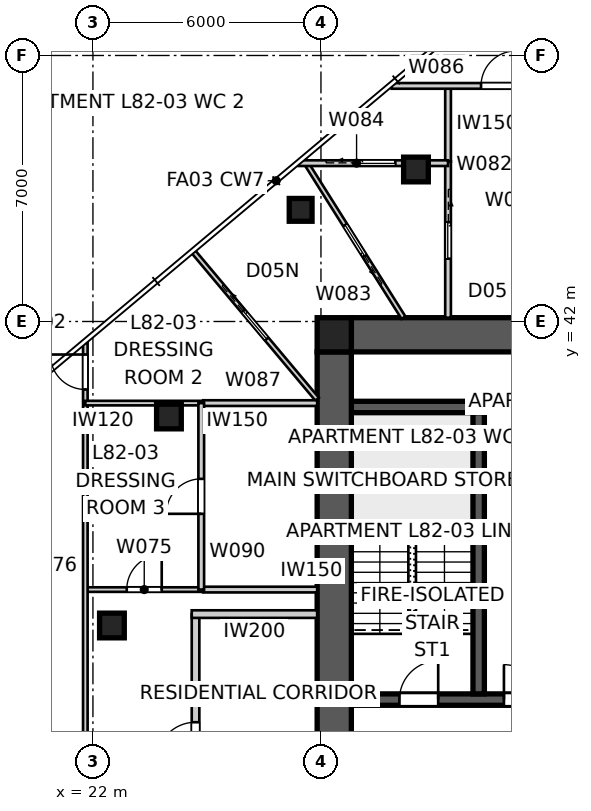
"""IFC4 building model, lengths in metres.
Left out: names, types, materials, properties, quantities, classifications, styles, units other than length and angle.
Written with IfcOpenShell. Run it as: python <this file> out.ifc"""

import sys

from ifc_helpers import new_model, si_unit, direction, frame, frame_2d, origin, origin_2d, place, context, subcontext, project, spatial, polyline, rectangle, outline, extrude, element, fill, save


model = new_model("IFC4")
c1 = context("Model", 3, precision=1e-05, world=origin(), true_north=direction((0.0, 1.0)))
c2 = subcontext(c1, "Body", "Model", "MODEL_VIEW")
j1 = project(units=[si_unit("LENGTHUNIT", "METRE"), si_unit("PLANEANGLEUNIT", "RADIAN")], contexts=[c1])
p1 = place(None, origin())
s1 = spatial("IfcSite", under=j1, at=p1, CompositionType="ELEMENT")
p2 = place(p1, origin())
s2 = spatial("IfcBuilding", under=s1, at=p2, CompositionType="ELEMENT")
p3 = place(p2, frame((0.0, 0.0, 296.4)))
s3 = spatial("IfcBuildingStorey", under=s2, at=p3, CompositionType="ELEMENT", Elevation=296.4)
p4 = place(p3, frame((28.8, 41.65, 0.0), z_axis=(0.0, 0.0, 1.0), x_axis=(1.0, 0.0, 0.0)))
e1 = element("IfcWall", 1, at=p4, inside=s3, PredefinedType="SHEAR", context=c2, shape_type="SweptSolid", body=[
    extrude(outline(polyline([(0.0, -0.45), (22.4, -0.45), (22.4, -0.025), (22.85, -0.025), (22.85, 0.025), (22.4, 0.025), (22.4, 0.45), (0.0, 0.45), (0.0, 0.025), (-0.45, 0.025), (-0.45, -0.025), (0.0, -0.025), (0.0, -0.45)])), origin(), (0.0, 0.0, 1.0), 3.4),
])
p5 = place(p3, frame((28.35, 41.2, 0.0), z_axis=(0.0, 0.0, 1.0), x_axis=(0.0, -1.0, 0.0)))
e2 = element("IfcWall", 2, at=p5, inside=s3, PredefinedType="SHEAR", context=c2, shape_type="SweptSolid", body=[
    extrude(outline(polyline([(0.0, -0.45), (22.4, -0.45), (22.4, -0.025), (22.85, -0.025), (22.85, 0.025), (22.4, 0.025), (22.4, 0.45), (0.0, 0.45), (0.0, 0.025), (-0.45, 0.025), (-0.45, -0.025), (0.0, -0.025), (0.0, -0.45)])), origin(), (0.0, 0.0, 1.0), 3.4),
])
p6 = place(p5, frame((11.14, 0.0, 0.0)))
e3 = element("IfcOpeningElement", 3, at=p6, cuts=e2, PredefinedType="OPENING", context=c2, shape_type="SweptSolid", body=[
    extrude(rectangle(XDim=1.02, YDim=2.4, at=frame_2d((0.51, 1.2))), frame((0.0, 0.46, 0.0), z_axis=(0.0, -1.0, 0.0), x_axis=(1.0, 0.0, 0.0)), (0.0, 0.0, 1.0), 0.92),
])
p7 = place(p3, frame((28.8, 32.05, 0.0), z_axis=(0.0, 0.0, 1.0), x_axis=(1.0, 0.0, 0.0)))
e4 = element("IfcWall", 4, at=p7, inside=s3, PredefinedType="SHEAR", context=c2, shape_type="SweptSolid", body=[
    extrude(rectangle(XDim=22.4, YDim=0.3, at=frame_2d((11.2, 0.0))), origin(), (0.0, 0.0, 1.0), 3.4),
])
p8 = place(p7, frame((19.04, 0.0, 0.0)))
e5 = element("IfcOpeningElement", 5, at=p8, cuts=e4, PredefinedType="OPENING", context=c2, shape_type="SweptSolid", body=[
    extrude(rectangle(XDim=0.92, YDim=2.1, at=frame_2d((0.46, 1.05))), frame((0.0, 0.16, 0.0), z_axis=(0.0, -1.0, 0.0), x_axis=(1.0, 0.0, 0.0)), (0.0, 0.0, 1.0), 0.32),
])
p9 = place(p7, frame((1.265, 0.0, 0.0)))
e6 = element("IfcOpeningElement", 6, at=p9, cuts=e4, PredefinedType="OPENING", context=c2, shape_type="SweptSolid", body=[
    extrude(rectangle(XDim=1.02, YDim=2.1, at=frame_2d((0.51, 1.05))), frame((0.0, 0.16, 0.0), z_axis=(0.0, -1.0, 0.0), x_axis=(1.0, 0.0, 0.0)), (0.0, 0.0, 1.0), 0.32),
])
p10 = place(p7, frame((4.015, 0.0, 0.0)))
e7 = element("IfcOpeningElement", 7, at=p10, cuts=e4, PredefinedType="OPENING", context=c2, shape_type="SweptSolid", body=[
    extrude(rectangle(XDim=0.92, YDim=2.1, at=frame_2d((0.46, 1.05))), frame((0.0, 0.16, 0.0), z_axis=(0.0, -1.0, 0.0), x_axis=(1.0, 0.0, 0.0)), (0.0, 0.0, 1.0), 0.32),
])
p11 = place(p7, frame((6.115, 0.0, 0.0)))
e8 = element("IfcOpeningElement", 8, at=p11, cuts=e4, PredefinedType="OPENING", context=c2, shape_type="SweptSolid", body=[
    extrude(rectangle(XDim=0.92, YDim=2.1, at=frame_2d((0.46, 1.05))), frame((0.0, 0.16, 0.0), z_axis=(0.0, -1.0, 0.0), x_axis=(1.0, 0.0, 0.0)), (0.0, 0.0, 1.0), 0.32),
])
p12 = place(p7, frame((9.79, 0.0, 0.0)))
e9 = element("IfcOpeningElement", 9, at=p12, cuts=e4, PredefinedType="OPENING", context=c2, shape_type="SweptSolid", body=[
    extrude(rectangle(XDim=0.92, YDim=2.1, at=frame_2d((0.46, 1.05))), frame((0.0, 0.16, 0.0), z_axis=(0.0, -1.0, 0.0), x_axis=(1.0, 0.0, 0.0)), (0.0, 0.0, 1.0), 0.32),
])
p13 = place(p7, frame((12.05, 0.0, 0.0)))
e10 = element("IfcOpeningElement", 10, at=p13, cuts=e4, PredefinedType="OPENING", context=c2, shape_type="SweptSolid", body=[
    extrude(rectangle(XDim=1.1, YDim=2.1, at=frame_2d((0.55, 1.05))), frame((0.0, 0.16, 0.0), z_axis=(0.0, -1.0, 0.0), x_axis=(1.0, 0.0, 0.0)), (0.0, 0.0, 1.0), 0.32),
])
p14 = place(p7, frame((14.85, 0.0, 0.0)))
e11 = element("IfcOpeningElement", 11, at=p14, cuts=e4, PredefinedType="OPENING", context=c2, shape_type="SweptSolid", body=[
    extrude(rectangle(XDim=1.1, YDim=2.1, at=frame_2d((0.55, 1.05))), frame((0.0, 0.16, 0.0), z_axis=(0.0, -1.0, 0.0), x_axis=(1.0, 0.0, 0.0)), (0.0, 0.0, 1.0), 0.32),
])
p15 = place(p3, frame((32.15, 32.2, 0.0), z_axis=(0.0, 0.0, 1.0), x_axis=(0.0, 1.0, 0.0)))
e12 = element("IfcWall", 12, at=p15, inside=s3, PredefinedType="SHEAR", context=c2, shape_type="SweptSolid", body=[
    extrude(rectangle(XDim=7.7, YDim=0.3, at=frame_2d((3.85, 0.0))), origin(), (0.0, 0.0, 1.0), 3.4),
])
p16 = place(p3, frame((28.8, 39.75, 0.0), z_axis=(0.0, 0.0, 1.0), x_axis=(1.0, 0.0, 0.0)))
e13 = element("IfcWall", 13, at=p16, inside=s3, PredefinedType="SHEAR", context=c2, shape_type="SweptSolid", body=[
    extrude(rectangle(XDim=3.5, YDim=0.3, at=frame_2d((1.75, 0.0))), origin(), (0.0, 0.0, 1.0), 3.4),
])
p17 = place(p3, frame((28.35, 41.65, 0.0), z_axis=(0.0, 0.0, 1.0), x_axis=(1.0, 0.0, 0.0)))
e14 = element("IfcColumn", 14, at=p17, inside=s3, PredefinedType="COLUMN", context=c2, shape_type="SweptSolid", body=[
    extrude(rectangle(XDim=0.9, YDim=0.9, at=origin_2d()), origin(), (0.0, 0.0, 1.0), 3.4),
])
p18 = place(p3, frame((27.466, 44.938, 0.0), z_axis=(0.0, 0.0, 1.0), x_axis=(1.0, 0.0, 0.0)))
e15 = element("IfcColumn", 15, at=p18, inside=s3, PredefinedType="COLUMN", context=c2, shape_type="SweptSolid", body=[
    extrude(rectangle(XDim=0.6, YDim=0.6, at=origin_2d()), origin(), (0.0, 0.0, 1.0), 3.4),
])
for number, where, z_axis, x_axis in (
    (16, (30.5, 46.0, 0.0), (0.0, 0.0, 1.0), (1.0, 0.0, 0.0)),
    (17, (24.0, 39.5, 0.0), (0.0, 0.0, 1.0), (1.0, 0.0, 0.0)),
    (18, (22.5, 34.0, 0.0), (0.0, 0.0, 1.0), (1.0, 0.0, 0.0)),
):
    element("IfcColumn", number, at=place(p3, frame(where, z_axis=z_axis, x_axis=x_axis)), inside=s3, PredefinedType="COLUMN", context=c2, shape_type="SweptSolid", body=[
        extrude(rectangle(XDim=0.65, YDim=0.65, at=origin_2d()), origin(), (0.0, 0.0, 1.0), 3.4),
    ])
p19 = place(p3, frame((24.7, 25.7, 0.0), z_axis=(0.0, 0.0, 1.0), x_axis=(0.0, 1.0, 0.0)))
e19 = element("IfcWall", 19, at=p19, inside=s3, PredefinedType="PARTITIONING", context=c2, shape_type="SweptSolid", body=[
    extrude(rectangle(XDim=8.6, YDim=0.2, at=frame_2d((4.3, 0.0))), origin(), (0.0, 0.0, 1.0), 3.2),
])
p20 = place(p19, frame((4.734, 0.0, 0.0)))
e20 = element("IfcOpeningElement", 20, at=p20, cuts=e19, PredefinedType="OPENING", context=c2, shape_type="SweptSolid", body=[
    extrude(rectangle(XDim=1.02, YDim=2.34, at=frame_2d((0.51, 1.17))), frame((0.0, 0.11, 0.0), z_axis=(0.0, -1.0, 0.0), x_axis=(1.0, 0.0, 0.0)), (0.0, 0.0, 1.0), 0.22),
])
p21 = place(p3, frame((27.9, 34.3, 0.0), z_axis=(0.0, 0.0, 1.0), x_axis=(-1.0, 0.0, 0.0)))
e21 = element("IfcWall", 21, at=p21, inside=s3, PredefinedType="PARTITIONING", context=c2, shape_type="SweptSolid", body=[
    extrude(rectangle(XDim=3.3, YDim=0.2, at=frame_2d((1.65, 0.0))), origin(), (0.0, 0.0, 1.0), 3.2),
])
p22 = place(p3, frame((24.9, 34.945, 0.0), z_axis=(0.0, 0.0, 1.0), x_axis=(1.0, 0.0, 0.0)))
e22 = element("IfcWall", 22, at=p22, inside=s3, PredefinedType="SOLIDWALL", context=c2, shape_type="SweptSolid", body=[
    extrude(rectangle(XDim=3.0, YDim=0.15, at=frame_2d((1.5, 0.0))), origin(), (0.0, 0.0, 1.0), 3.2),
])
p23 = place(p3, frame((21.8, 34.945, 0.0), z_axis=(0.0, 0.0, 1.0), x_axis=(1.0, 0.0, 0.0)))
e23 = element("IfcWall", 23, at=p23, inside=s3, PredefinedType="PARTITIONING", context=c2, shape_type="SweptSolid", body=[
    extrude(rectangle(XDim=3.1, YDim=0.12, at=frame_2d((1.55, 0.0))), origin(), (0.0, 0.0, 1.0), 3.2),
])
p24 = place(p23, frame((1.09, 0.0, 0.0)))
e24 = element("IfcOpeningElement", 24, at=p24, cuts=e23, PredefinedType="OPENING", context=c2, shape_type="SweptSolid", body=[
    extrude(rectangle(XDim=0.92, YDim=2.1, at=frame_2d((0.46, 1.05))), frame((0.0, 0.07, 0.0), z_axis=(0.0, -1.0, 0.0), x_axis=(1.0, 0.0, 0.0)), (0.0, 0.0, 1.0), 0.14),
])
p25 = place(p3, frame((21.8, 25.498, 0.0), z_axis=(0.0, 0.0, 1.0), x_axis=(0.0, 1.0, 0.0)))
e25 = element("IfcWall", 25, at=p25, inside=s3, PredefinedType="PARTITIONING", context=c2, shape_type="SweptSolid", body=[
    extrude(rectangle(XDim=15.939, YDim=0.12, at=frame_2d((7.969, 0.0))), origin(), (0.0, 0.0, 1.0), 3.2),
])
p26 = place(p25, frame((4.486, 0.0, 0.0)))
e26 = element("IfcOpeningElement", 26, at=p26, cuts=e25, PredefinedType="OPENING", context=c2, shape_type="SweptSolid", body=[
    extrude(rectangle(XDim=0.92, YDim=2.34, at=frame_2d((0.46, 1.17))), frame((0.0, 0.07, 0.0), z_axis=(0.0, -1.0, 0.0), x_axis=(1.0, 0.0, 0.0)), (0.0, 0.0, 1.0), 0.14),
])
p27 = place(p25, frame((14.713, 0.0, 0.0)))
e27 = element("IfcOpeningElement", 27, at=p27, cuts=e25, PredefinedType="OPENING", context=c2, shape_type="SweptSolid", body=[
    extrude(rectangle(XDim=0.92, YDim=2.34, at=frame_2d((0.46, 1.17))), frame((0.0, 0.07, 0.0), z_axis=(0.0, -1.0, 0.0), x_axis=(1.0, 0.0, 0.0)), (0.0, 0.0, 1.0), 0.14),
])
p28 = place(p3, frame((31.344, 48.2, 0.0), z_axis=(0.0, 0.0, 1.0), x_axis=(0.0, -1.0, 0.0)))
e28 = element("IfcWall", 28, at=p28, inside=s3, PredefinedType="SOLIDWALL", context=c2, shape_type="SweptSolid", body=[
    extrude(rectangle(XDim=1.992, YDim=0.15, at=frame_2d((0.996, 0.0))), origin(), (0.0, 0.0, 1.0), 3.2),
])
p29 = place(p3, frame((31.344, 46.208, 0.0), z_axis=(0.0, 0.0, 1.0), x_axis=(0.0, -1.0, 0.0)))
e29 = element("IfcWall", 29, at=p29, inside=s3, PredefinedType="SOLIDWALL", context=c2, shape_type="SweptSolid", body=[
    extrude(rectangle(XDim=4.108, YDim=0.15, at=frame_2d((2.054, 0.0))), origin(), (0.0, 0.0, 1.0), 2.672),
])
p30 = place(p29, frame((1.595, 0.0, 0.0)))
e30 = element("IfcOpeningElement", 30, at=p30, cuts=e29, PredefinedType="OPENING", context=c2, shape_type="SweptSolid", body=[
    extrude(rectangle(XDim=0.96, YDim=2.1, at=frame_2d((0.48, 1.05))), frame((0.0, 0.085, 0.0), z_axis=(0.0, -1.0, 0.0), x_axis=(1.0, 0.0, 0.0)), (0.0, 0.0, 1.0), 0.17),
])
p31 = place(p3, frame((30.172, 42.1, 0.0), z_axis=(0.0, 0.0, 1.0), x_axis=(-0.532913303443, 0.846169847616, 0.0)))
e31 = element("IfcWall", 31, at=p31, inside=s3, PredefinedType="PARTITIONING", context=c2, shape_type="SweptSolid", body=[
    extrude(rectangle(XDim=4.919, YDim=0.12, at=frame_2d((2.46, 0.0))), origin(), (0.0, 0.0, 1.0), 3.2),
])
p32 = place(p31, frame((1.923, 0.0, 0.0)))
e32 = element("IfcOpeningElement", 32, at=p32, cuts=e31, PredefinedType="OPENING", context=c2, shape_type="SweptSolid", body=[
    extrude(rectangle(XDim=0.96, YDim=2.0, at=frame_2d((0.48, 1.0))), frame((0.0, 0.07, 0.0), z_axis=(0.0, -1.0, 0.0), x_axis=(1.0, 0.0, 0.0)), (0.0, 0.0, 1.0), 0.14),
])
p33 = place(p3, frame((27.414, 46.167, 0.0), z_axis=(0.0, 0.0, 1.0), x_axis=(1.0, 0.0, 0.0)))
e33 = element("IfcWall", 33, at=p33, inside=s3, PredefinedType="SOLIDWALL", context=c2, shape_type="SweptSolid", body=[
    extrude(rectangle(XDim=3.046, YDim=0.15, at=frame_2d((1.523, 0.0))), origin(), (0.0, 0.0, 1.0), 3.2),
])
p34 = place(p33, frame((1.583, 0.0, 0.0)))
e34 = element("IfcOpeningElement", 34, at=p34, cuts=e33, PredefinedType="OPENING", context=c2, shape_type="SweptSolid", body=[
    extrude(rectangle(XDim=0.96, YDim=2.1, at=frame_2d((0.48, 1.05))), frame((0.0, 0.085, 0.0), z_axis=(0.0, -1.0, 0.0), x_axis=(1.0, 0.0, 0.0)), (0.0, 0.0, 1.0), 0.17),
])
p35 = place(p3, frame((30.46, 46.167, 0.0), z_axis=(0.0, 0.0, 1.0), x_axis=(1.0, 0.0, 0.0)))
e35 = element("IfcWall", 35, at=p35, inside=s3, PredefinedType="SOLIDWALL", context=c2, shape_type="SweptSolid", body=[
    extrude(rectangle(XDim=0.884, YDim=0.15, at=frame_2d((0.442, 0.0))), origin(), (0.0, 0.0, 1.0), 2.2),
])
p36 = place(p3, frame((29.86, 48.2, 0.0), z_axis=(0.0, 0.0, 1.0), x_axis=(1.0, 0.0, 0.0)))
e36 = element("IfcWall", 36, at=p36, inside=s3, PredefinedType="SOLIDWALL", context=c2, shape_type="SweptSolid", body=[
    extrude(rectangle(XDim=4.141, YDim=0.15, at=frame_2d((2.07, 0.0))), origin(), (0.0, 0.0, 1.0), 3.2),
])
p37 = place(p36, frame((2.353, 0.0, 0.0)))
e37 = element("IfcOpeningElement", 37, at=p37, cuts=e36, PredefinedType="OPENING", context=c2, shape_type="SweptSolid", body=[
    extrude(rectangle(XDim=0.92, YDim=2.34, at=frame_2d((0.46, 1.17))), frame((0.0, 0.085, 0.0), z_axis=(0.0, -1.0, 0.0), x_axis=(1.0, 0.0, 0.0)), (0.0, 0.0, 1.0), 0.17),
])
p38 = place(p3, frame((24.65, 43.828, 0.0), z_axis=(0.0, 0.0, 1.0), x_axis=(0.64277866568, -0.766051947943, 0.0)))
e38 = element("IfcWall", 38, at=p38, inside=s3, PredefinedType="PARTITIONING", context=c2, shape_type="SweptSolid", body=[
    extrude(rectangle(XDim=5.056, YDim=0.12, at=frame_2d((2.528, 0.0))), origin(), (0.0, 0.0, 1.0), 3.2),
])
p39 = place(p38, frame((2.028, 0.0, 0.0)))
e39 = element("IfcOpeningElement", 39, at=p39, cuts=e38, PredefinedType="OPENING", context=c2, shape_type="SweptSolid", body=[
    extrude(rectangle(XDim=0.96, YDim=2.0, at=frame_2d((0.48, 1.0))), frame((0.0, 0.07, 0.0), z_axis=(0.0, -1.0, 0.0), x_axis=(1.0, 0.0, 0.0)), (0.0, 0.0, 1.0), 0.14),
])
p40 = place(p3, frame((27.9, 39.852, 0.0), z_axis=(0.0, 0.0, 1.0), x_axis=(-1.0, 0.0, 0.0)))
e40 = element("IfcWall", 40, at=p40, inside=s3, PredefinedType="SOLIDWALL", context=c2, shape_type="SweptSolid", body=[
    extrude(rectangle(XDim=3.0, YDim=0.15, at=frame_2d((1.5, 0.0))), origin(), (0.0, 0.0, 1.0), 3.2),
])
p41 = place(p3, frame((24.9, 39.852, 0.0), z_axis=(0.0, 0.0, 1.0), x_axis=(-1.0, 0.0, 0.0)))
e41 = element("IfcWall", 41, at=p41, inside=s3, PredefinedType="PARTITIONING", context=c2, shape_type="SweptSolid", body=[
    extrude(rectangle(XDim=3.1, YDim=0.12, at=frame_2d((1.55, 0.0))), origin(), (0.0, 0.0, 1.0), 3.2),
])
p42 = place(p3, frame((24.85, 34.945, 0.0), z_axis=(0.0, 0.0, 1.0), x_axis=(0.0, 1.0, 0.0)))
e42 = element("IfcWall", 42, at=p42, inside=s3, PredefinedType="SOLIDWALL", context=c2, shape_type="SweptSolid", body=[
    extrude(rectangle(XDim=4.907, YDim=0.15, at=frame_2d((2.454, 0.0))), origin(), (0.0, 0.0, 1.0), 3.2),
])
p43 = place(p42, frame((1.994, 0.0, 0.0)))
e43 = element("IfcOpeningElement", 43, at=p43, cuts=e42, PredefinedType="OPENING", context=c2, shape_type="SweptSolid", body=[
    extrude(rectangle(XDim=0.92, YDim=2.34, at=frame_2d((0.46, 1.17))), frame((0.0, 0.085, 0.0), z_axis=(0.0, -1.0, 0.0), x_axis=(1.0, 0.0, 0.0)), (0.0, 0.0, 1.0), 0.17),
])
p44 = place(p3, frame((21.8, 26.021, 0.0), z_axis=(0.0, 0.0, 1.0), x_axis=(-0.642785106342, 0.766046543668, 0.0)))
e44 = element("IfcWall", 44, at=p44, inside=s3, PredefinedType="PARTITIONING", context=c2, shape_type="SweptSolid", body=[
    extrude(rectangle(XDim=7.81, YDim=0.12, at=frame_2d((3.905, 0.0))), origin(), (0.0, 0.0, 1.0), 3.2),
])
p45 = place(p44, frame((5.465, 0.0, 0.0)))
e45 = element("IfcOpeningElement", 45, at=p45, cuts=e44, PredefinedType="OPENING", context=c2, shape_type="SweptSolid", body=[
    extrude(rectangle(XDim=0.92, YDim=2.34, at=frame_2d((0.46, 1.17))), frame((0.0, 0.07, 0.0), z_axis=(0.0, -1.0, 0.0), x_axis=(1.0, 0.0, 0.0)), (0.0, 0.0, 1.0), 0.14),
])
p46 = place(p9, origin())
e46 = element("IfcDoor", 46, at=p46, inside=s3, OperationType="SINGLE_SWING_RIGHT", PredefinedType="DOOR", context=c2, shape_type="SweptSolid", body=[
    extrude(rectangle(XDim=1.02, YDim=2.1, at=frame_2d((0.51, 1.05))), frame((0.0, 0.025, 0.0), z_axis=(0.0, -1.0, 0.0), x_axis=(1.0, 0.0, 0.0)), (0.0, 0.0, 1.0), 0.05),
])
fill(e6, e46)
p47 = place(p10, origin())
e47 = element("IfcDoor", 47, at=p47, inside=s3, OperationType="SINGLE_SWING_LEFT", PredefinedType="DOOR", context=c2, shape_type="SweptSolid", body=[
    extrude(rectangle(XDim=0.92, YDim=2.1, at=frame_2d((0.46, 1.05))), frame((0.0, 0.025, 0.0), z_axis=(0.0, -1.0, 0.0), x_axis=(1.0, 0.0, 0.0)), (0.0, 0.0, 1.0), 0.05),
])
fill(e7, e47)
p48 = place(p20, origin())
e48 = element("IfcDoor", 48, at=p48, inside=s3, OperationType="SINGLE_SWING_LEFT", PredefinedType="DOOR", context=c2, shape_type="SweptSolid", body=[
    extrude(rectangle(XDim=1.02, YDim=2.34, at=frame_2d((0.51, 1.17))), frame((0.0, 0.025, 0.0), z_axis=(0.0, -1.0, 0.0), x_axis=(1.0, 0.0, 0.0)), (0.0, 0.0, 1.0), 0.05),
])
fill(e20, e48)
p49 = place(p24, origin())
e49 = element("IfcDoor", 49, at=p49, inside=s3, OperationType="SINGLE_SWING_RIGHT", PredefinedType="DOOR", context=c2, shape_type="SweptSolid", body=[
    extrude(rectangle(XDim=0.92, YDim=2.1, at=frame_2d((0.46, 1.05))), frame((0.0, 0.025, 0.0), z_axis=(0.0, -1.0, 0.0), x_axis=(1.0, 0.0, 0.0)), (0.0, 0.0, 1.0), 0.05),
])
fill(e24, e49)
p50 = place(p27, origin())
e50 = element("IfcDoor", 50, at=p50, inside=s3, OperationType="SINGLE_SWING_RIGHT", PredefinedType="DOOR", context=c2, shape_type="SweptSolid", body=[
    extrude(rectangle(XDim=0.92, YDim=2.34, at=frame_2d((0.46, 1.17))), frame((0.0, 0.025, 0.0), z_axis=(0.0, -1.0, 0.0), x_axis=(1.0, 0.0, 0.0)), (0.0, 0.0, 1.0), 0.05),
])
fill(e27, e50)
p51 = place(p43, origin())
e51 = element("IfcDoor", 51, at=p51, inside=s3, OperationType="SINGLE_SWING_LEFT", PredefinedType="DOOR", context=c2, shape_type="SweptSolid", body=[
    extrude(rectangle(XDim=0.92, YDim=2.34, at=frame_2d((0.46, 1.17))), frame((0.0, 0.025, 0.0), z_axis=(0.0, -1.0, 0.0), x_axis=(1.0, 0.0, 0.0)), (0.0, 0.0, 1.0), 0.05),
])
fill(e43, e51)
p52 = place(p39, origin())
e52 = element("IfcDoor", 52, at=p52, inside=s3, OperationType="SLIDING_TO_LEFT", PredefinedType="DOOR", context=c2, shape_type="SweptSolid", body=[
    extrude(rectangle(XDim=0.96, YDim=2.0, at=frame_2d((0.48, 1.0))), frame((0.0, 0.025, 0.0), z_axis=(0.0, -1.0, 0.0), x_axis=(1.0, 0.0, 0.0)), (0.0, 0.0, 1.0), 0.05),
])
fill(e39, e52)
p53 = place(p32, origin())
e53 = element("IfcDoor", 53, at=p53, inside=s3, OperationType="SLIDING_TO_LEFT", PredefinedType="DOOR", context=c2, shape_type="SweptSolid", body=[
    extrude(rectangle(XDim=0.96, YDim=2.0, at=frame_2d((0.48, 1.0))), frame((0.0, 0.025, 0.0), z_axis=(0.0, -1.0, 0.0), x_axis=(1.0, 0.0, 0.0)), (0.0, 0.0, 1.0), 0.05),
])
fill(e32, e53)
p54 = place(p30, origin())
e54 = element("IfcDoor", 54, at=p54, inside=s3, OperationType="SLIDING_TO_LEFT", PredefinedType="DOOR", context=c2, shape_type="SweptSolid", body=[
    extrude(rectangle(XDim=0.96, YDim=2.1, at=frame_2d((0.48, 1.05))), frame((0.0, 0.025, 0.0), z_axis=(0.0, -1.0, 0.0), x_axis=(1.0, 0.0, 0.0)), (0.0, 0.0, 1.0), 0.05),
])
fill(e30, e54)
p55 = place(p34, origin())
e55 = element("IfcDoor", 55, at=p55, inside=s3, OperationType="SLIDING_TO_LEFT", PredefinedType="DOOR", context=c2, shape_type="SweptSolid", body=[
    extrude(rectangle(XDim=0.96, YDim=2.1, at=frame_2d((0.48, 1.05))), frame((0.0, 0.025, 0.0), z_axis=(0.0, -1.0, 0.0), x_axis=(1.0, 0.0, 0.0)), (0.0, 0.0, 1.0), 0.05),
])
fill(e34, e55)
p56 = place(p37, origin())
e56 = element("IfcDoor", 56, at=p56, inside=s3, OperationType="SINGLE_SWING_RIGHT", PredefinedType="DOOR", context=c2, shape_type="SweptSolid", body=[
    extrude(rectangle(XDim=0.92, YDim=2.34, at=frame_2d((0.46, 1.17))), frame((0.0, 0.025, 0.0), z_axis=(0.0, -1.0, 0.0), x_axis=(1.0, 0.0, 0.0)), (0.0, 0.0, 1.0), 0.05),
])
fill(e37, e56)
save(model, sys.argv[1])
